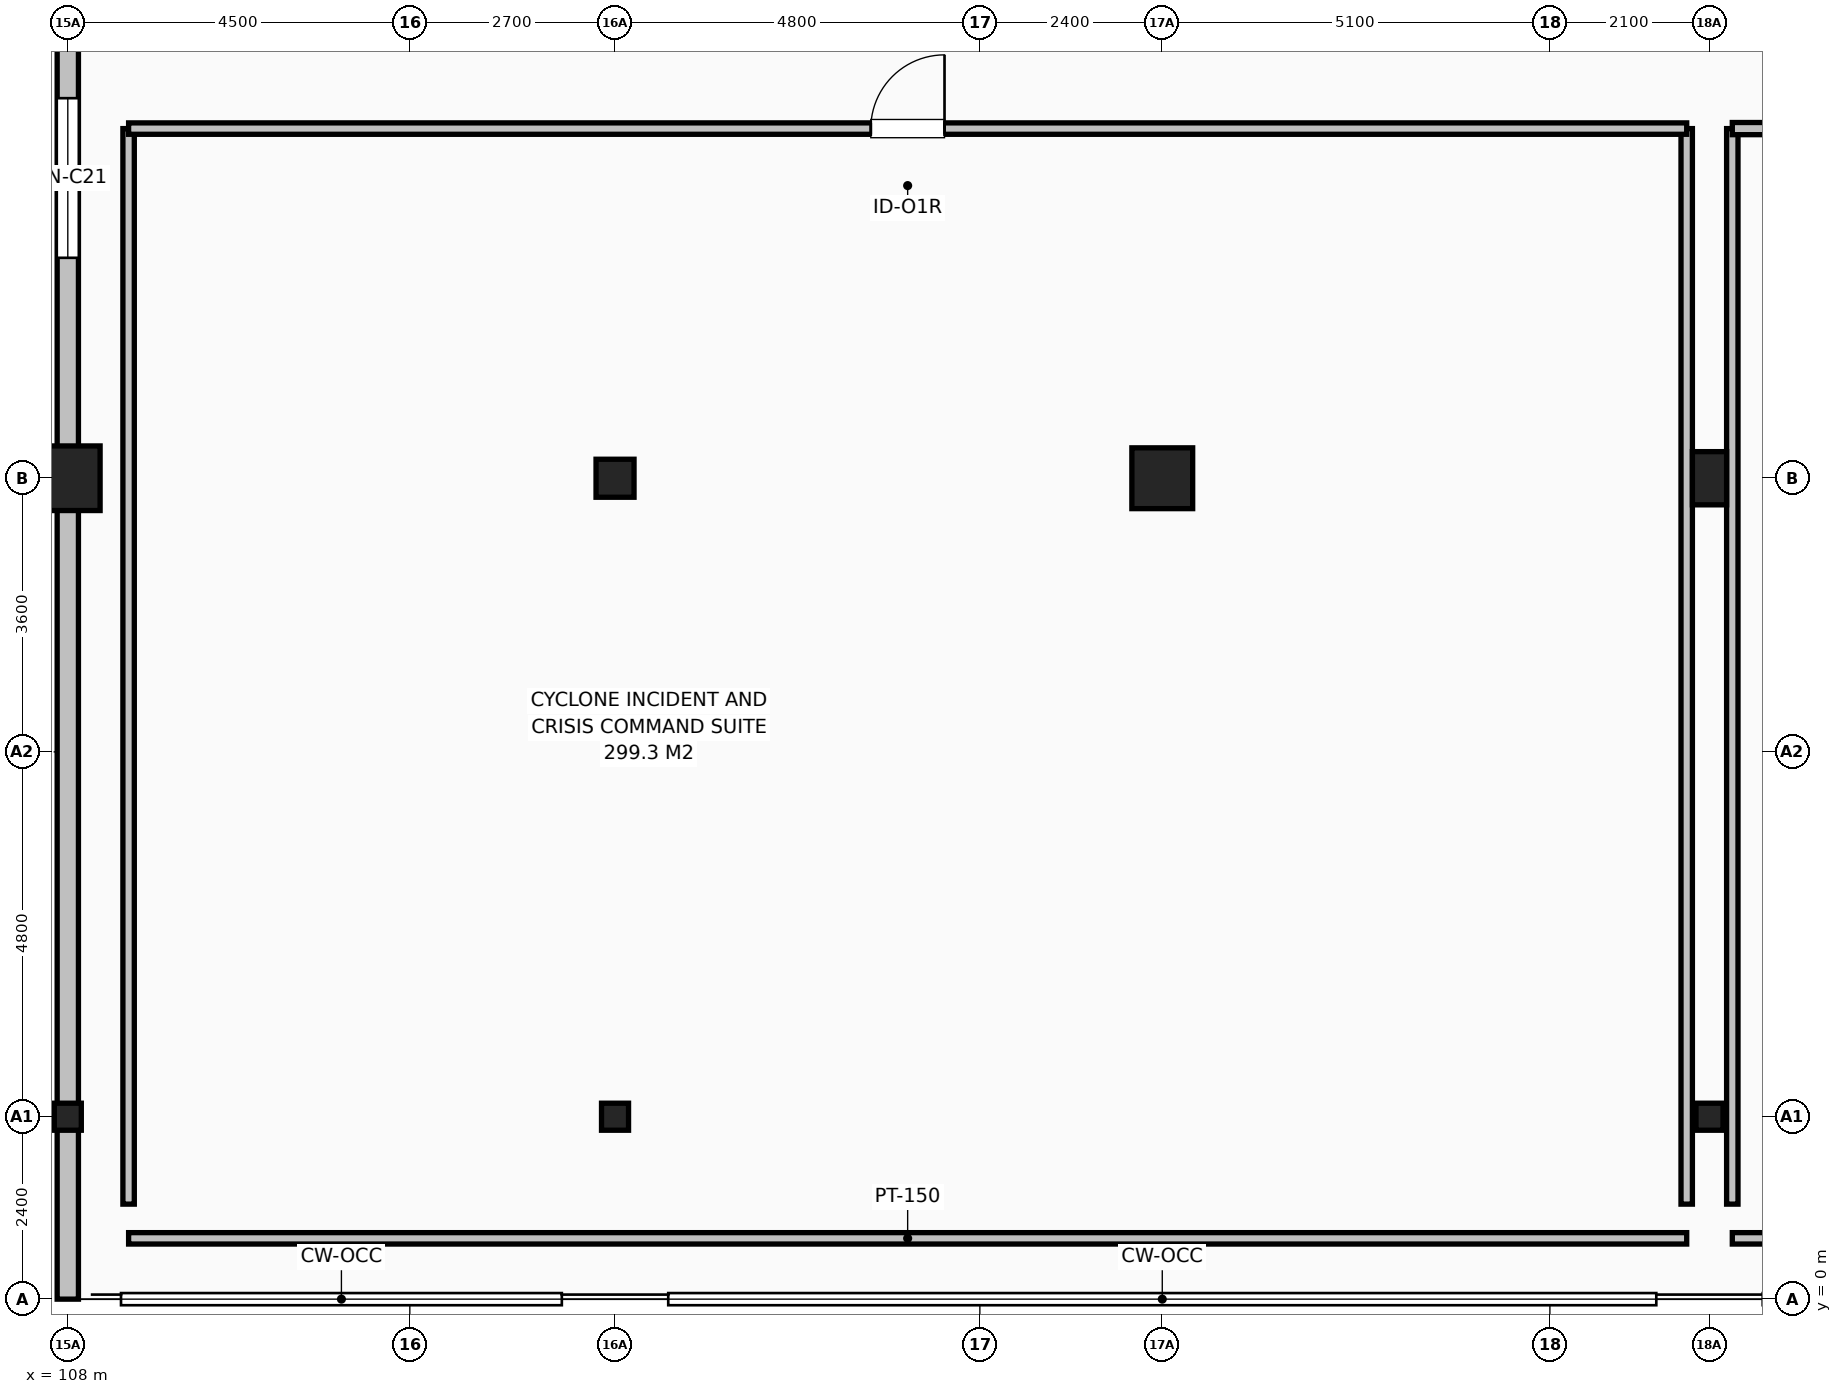
"""IFC4 building model, lengths in metres.
Left out: names, types, materials, properties, quantities, classifications, styles, units other than length and angle.
Written with IfcOpenShell. Run it as: python <this file> out.ifc"""

import sys

from ifc_helpers import new_model, si_unit, direction, frame, frame_2d, origin, origin_2d, place, context, subcontext, project, spatial, rectangle, hollow_circle, extrude, element, fill, save


model = new_model("IFC4")
c1 = context("Model", 3, precision=1e-05, world=origin(), true_north=direction((0.0, 1.0)))
c2 = subcontext(c1, "Body", "Model", "MODEL_VIEW")
j1 = project(units=[si_unit("LENGTHUNIT", "METRE"), si_unit("PLANEANGLEUNIT", "RADIAN")], contexts=[c1])
p1 = place(None, origin())
s1 = spatial("IfcSite", under=j1, at=p1, CompositionType="ELEMENT")
p2 = place(p1, origin())
s2 = spatial("IfcBuilding", under=s1, at=p2, CompositionType="ELEMENT")
p3 = place(p2, frame((0.0, 0.0, 9.0)))
s3 = spatial("IfcBuildingStorey", under=s2, at=p3, CompositionType="ELEMENT", Elevation=9.0)
p4 = place(p3, frame((108.0, 10.8, 0.0), z_axis=(0.0, 0.0, 1.0), x_axis=(1.0, 0.0, 0.0)))
e1 = element("IfcColumn", 1, at=p4, inside=s3, PredefinedType="COLUMN", context=c2, shape_type="SweptSolid", body=[
    extrude(rectangle(XDim=0.85, YDim=0.85, at=origin_2d()), origin(), (0.0, 0.0, 1.0), 4.2),
])
p5 = place(p3, frame((115.2, 10.8, 0.0), z_axis=(0.0, 0.0, 1.0), x_axis=(1.0, 0.0, 0.0)))
e2 = element("IfcColumn", 2, at=p5, inside=s3, PredefinedType="COLUMN", context=c2, shape_type="SweptSolid", body=[
    extrude(rectangle(XDim=0.5, YDim=0.5, at=origin_2d()), origin(), (0.0, 0.0, 1.0), 4.2),
])
p6 = place(p3, frame((122.4, 10.8, 0.0), z_axis=(0.0, 0.0, 1.0), x_axis=(1.0, 0.0, 0.0)))
e3 = element("IfcColumn", 3, at=p6, inside=s3, PredefinedType="COLUMN", context=c2, shape_type="SweptSolid", body=[
    extrude(rectangle(XDim=0.8, YDim=0.8, at=origin_2d()), origin(), (0.0, 0.0, 1.0), 4.2),
])
p7 = place(p3, frame((129.6, 10.8, 0.0), z_axis=(0.0, 0.0, 1.0), x_axis=(1.0, 0.0, 0.0)))
e4 = element("IfcColumn", 4, at=p7, inside=s3, PredefinedType="COLUMN", context=c2, shape_type="SweptSolid", body=[
    extrude(rectangle(XDim=0.45, YDim=0.7, at=origin_2d()), origin(), (0.0, 0.0, 1.0), 4.2),
])
for number, where, z_axis, x_axis in (
    (5, (115.2, 2.4, 0.0), (0.0, 0.0, 1.0), (1.0, 0.0, 0.0)),
    (6, (129.6, 2.4, 0.0), (0.0, 0.0, 1.0), (1.0, 0.0, 0.0)),
    (7, (108.0, 2.4, 0.0), (0.0, 0.0, 1.0), (1.0, 0.0, 0.0)),
):
    element("IfcColumn", number, at=place(p3, frame(where, z_axis=z_axis, x_axis=x_axis)), inside=s3, PredefinedType="COLUMN", context=c2, shape_type="SweptSolid", body=[
        extrude(hollow_circle(Radius=0.178, WallThickness=0.013, at=origin_2d()), origin(), (0.0, 0.0, 1.0), 4.2),
    ])
p8 = place(p3, frame((108.0, 54.0, 0.0), z_axis=(0.0, 0.0, 1.0), x_axis=(0.0, -1.0, 0.0)))
e8 = element("IfcWall", 8, at=p8, inside=s3, PredefinedType="SOLIDWALL", context=c2, shape_type="SweptSolid", body=[
    extrude(rectangle(XDim=54.0, YDim=0.28, at=frame_2d((27.0, 0.0))), origin(), (0.0, 0.0, 1.0), 3.4),
])
p9 = place(p8, frame((2.2, 0.0, 0.78)))
e9 = element("IfcOpeningElement", 9, at=p9, cuts=e8, PredefinedType="OPENING", context=c2, shape_type="SweptSolid", body=[
    extrude(rectangle(XDim=1.25, YDim=1.7, at=frame_2d((0.625, 0.85))), frame((0.0, 0.15, 0.0), z_axis=(0.0, -1.0, 0.0), x_axis=(1.0, 0.0, 0.0)), (0.0, 0.0, 1.0), 0.3),
])
p10 = place(p8, frame((16.6, 0.0, 0.78)))
e10 = element("IfcOpeningElement", 10, at=p10, cuts=e8, PredefinedType="OPENING", context=c2, shape_type="SweptSolid", body=[
    extrude(rectangle(XDim=1.5, YDim=1.75, at=frame_2d((0.75, 0.875))), frame((0.0, 0.15, 0.0), z_axis=(0.0, -1.0, 0.0), x_axis=(1.0, 0.0, 0.0)), (0.0, 0.0, 1.0), 0.3),
])
p11 = place(p8, frame((23.8, 0.0, 0.78)))
e11 = element("IfcOpeningElement", 11, at=p11, cuts=e8, PredefinedType="OPENING", context=c2, shape_type="SweptSolid", body=[
    extrude(rectangle(XDim=1.65, YDim=1.8, at=frame_2d((0.825, 0.9))), frame((0.0, 0.15, 0.0), z_axis=(0.0, -1.0, 0.0), x_axis=(1.0, 0.0, 0.0)), (0.0, 0.0, 1.0), 0.3),
])
p12 = place(p8, frame((31.0, 0.0, 0.78)))
e12 = element("IfcOpeningElement", 12, at=p12, cuts=e8, PredefinedType="OPENING", context=c2, shape_type="SweptSolid", body=[
    extrude(rectangle(XDim=1.95, YDim=1.8, at=frame_2d((0.975, 0.9))), frame((0.0, 0.15, 0.0), z_axis=(0.0, -1.0, 0.0), x_axis=(1.0, 0.0, 0.0)), (0.0, 0.0, 1.0), 0.3),
])
p13 = place(p8, frame((38.2, 0.0, 0.78)))
e13 = element("IfcOpeningElement", 13, at=p13, cuts=e8, PredefinedType="OPENING", context=c2, shape_type="SweptSolid", body=[
    extrude(rectangle(XDim=2.1, YDim=1.8, at=frame_2d((1.05, 0.9))), frame((0.0, 0.15, 0.0), z_axis=(0.0, -1.0, 0.0), x_axis=(1.0, 0.0, 0.0)), (0.0, 0.0, 1.0), 0.3),
])
p14 = place(p3, frame((129.3, 0.8, 0.0), z_axis=(0.0, 0.0, 1.0), x_axis=(-1.0, 0.0, 0.0)))
e14 = element("IfcWall", 14, at=p14, inside=s3, PredefinedType="PARTITIONING", context=c2, shape_type="SweptSolid", body=[
    extrude(rectangle(XDim=20.5, YDim=0.15, at=frame_2d((10.25, 0.0))), origin(), (0.0, 0.0, 1.0), 3.502),
])
p15 = place(p3, frame((129.3, 1.25, 0.0), z_axis=(0.0, 0.0, 1.0), x_axis=(0.0, 1.0, 0.0)))
e15 = element("IfcWall", 15, at=p15, inside=s3, PredefinedType="PARTITIONING", context=c2, shape_type="SweptSolid", body=[
    extrude(rectangle(XDim=14.15, YDim=0.15, at=frame_2d((7.075, 0.0))), origin(), (0.0, 0.0, 1.0), 3.244),
])
p16 = place(p3, frame((108.8, 15.4, 0.0), z_axis=(0.0, 0.0, 1.0), x_axis=(0.0, -1.0, 0.0)))
e16 = element("IfcWall", 16, at=p16, inside=s3, PredefinedType="PARTITIONING", context=c2, shape_type="SweptSolid", body=[
    extrude(rectangle(XDim=14.15, YDim=0.15, at=frame_2d((7.075, 0.0))), origin(), (0.0, 0.0, 1.0), 3.002),
])
p17 = place(p3, frame((108.8, 15.4, 0.0), z_axis=(0.0, 0.0, 1.0), x_axis=(1.0, 0.0, 0.0)))
e17 = element("IfcWall", 17, at=p17, inside=s3, PredefinedType="PARTITIONING", context=c2, shape_type="SweptSolid", body=[
    extrude(rectangle(XDim=20.5, YDim=0.15, at=frame_2d((10.25, 0.0))), origin(), (0.0, 0.0, 1.0), 3.357),
])
p18 = place(p17, frame((9.765, 0.0, 0.0)))
e18 = element("IfcOpeningElement", 18, at=p18, cuts=e17, PredefinedType="OPENING", context=c2, shape_type="SweptSolid", body=[
    extrude(rectangle(XDim=0.97, YDim=2.15, at=frame_2d((0.485, 1.075))), frame((0.0, 0.085, 0.0), z_axis=(0.0, -1.0, 0.0), x_axis=(1.0, 0.0, 0.0)), (0.0, 0.0, 1.0), 0.17),
])
p19 = place(p3, frame((150.9, 0.8, 0.0), z_axis=(0.0, 0.0, 1.0), x_axis=(-1.0, 0.0, 0.0)))
e19 = element("IfcWall", 19, at=p19, inside=s3, PredefinedType="PARTITIONING", context=c2, shape_type="SweptSolid", body=[
    extrude(rectangle(XDim=21.0, YDim=0.15, at=frame_2d((10.5, 0.0))), origin(), (0.0, 0.0, 1.0), 3.502),
])
p20 = place(p3, frame((129.9, 15.4, 0.0), z_axis=(0.0, 0.0, 1.0), x_axis=(0.0, -1.0, 0.0)))
e20 = element("IfcWall", 20, at=p20, inside=s3, PredefinedType="PARTITIONING", context=c2, shape_type="SweptSolid", body=[
    extrude(rectangle(XDim=14.15, YDim=0.15, at=frame_2d((7.075, 0.0))), origin(), (0.0, 0.0, 1.0), 3.207),
])
p21 = place(p3, frame((129.9, 15.4, 0.0), z_axis=(0.0, 0.0, 1.0), x_axis=(1.0, 0.0, 0.0)))
e21 = element("IfcWall", 21, at=p21, inside=s3, PredefinedType="PARTITIONING", context=c2, shape_type="SweptSolid", body=[
    extrude(rectangle(XDim=21.0, YDim=0.16, at=frame_2d((10.5, 0.0))), origin(), (0.0, 0.0, 1.0), 3.207),
])
p22 = place(p21, frame((10.0, 0.0, 0.0)))
e22 = element("IfcOpeningElement", 22, at=p22, cuts=e21, PredefinedType="OPENING", context=c2, shape_type="SweptSolid", body=[
    extrude(rectangle(XDim=1.0, YDim=2.15, at=frame_2d((0.5, 1.075))), frame((0.0, 0.09, 0.0), z_axis=(0.0, -1.0, 0.0), x_axis=(1.0, 0.0, 0.0)), (0.0, 0.0, 1.0), 0.18),
])
p23 = place(p13, origin())
e23 = element("IfcWindow", 23, at=p23, inside=s3, PartitioningType="SINGLE_PANEL", PredefinedType="WINDOW", context=c2, shape_type="SweptSolid", body=[
    extrude(rectangle(XDim=2.1, YDim=1.8, at=frame_2d((1.05, 0.9))), frame((0.0, 0.03, 0.0), z_axis=(0.0, -1.0, 0.0), x_axis=(1.0, 0.0, 0.0)), (0.0, 0.0, 1.0), 0.06),
])
fill(e13, e23)
p24 = place(p18, origin())
e24 = element("IfcDoor", 24, at=p24, inside=s3, OperationType="SINGLE_SWING_RIGHT", PredefinedType="DOOR", context=c2, shape_type="SweptSolid", body=[
    extrude(rectangle(XDim=0.97, YDim=2.15, at=frame_2d((0.485, 1.075))), frame((0.0, 0.025, 0.0), z_axis=(0.0, -1.0, 0.0), x_axis=(1.0, 0.0, 0.0)), (0.0, 0.0, 1.0), 0.05),
])
fill(e18, e24)
save(model, sys.argv[1])
